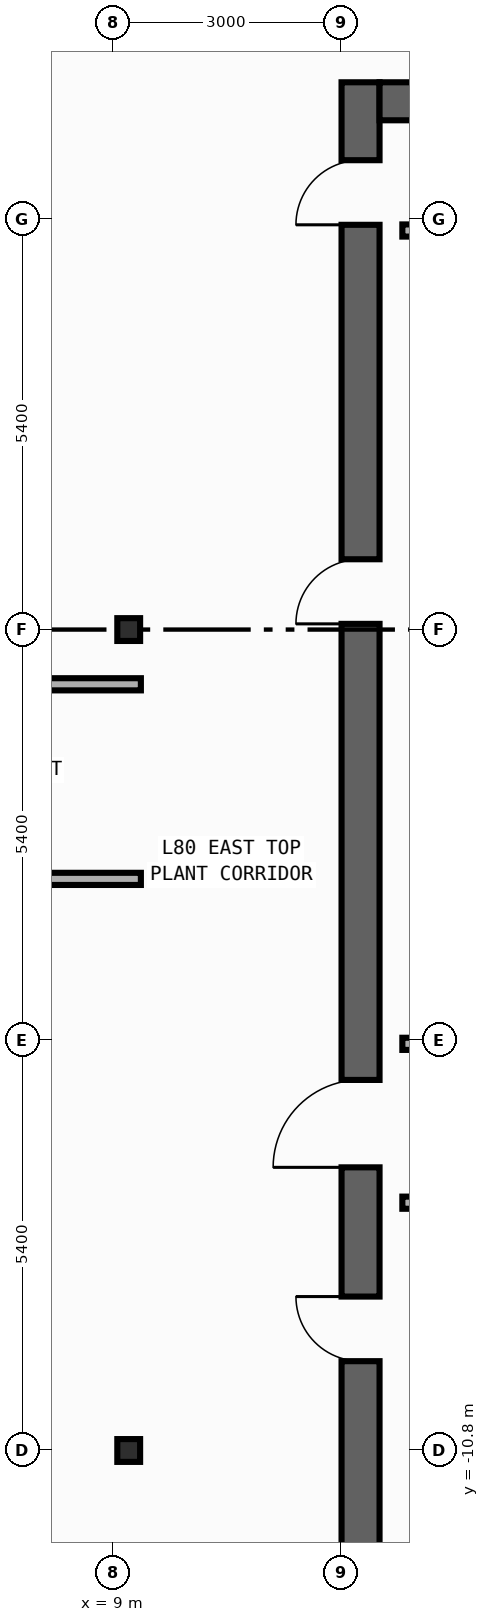
"""IFC4 building model, lengths in metres.
Left out: names, types, materials, properties, quantities, classifications, styles, units other than length and angle.
Written with IfcOpenShell. Run it as: python <this file> out.ifc"""

import sys

from ifc_helpers import new_model, si_unit, direction, frame, frame_2d, origin, origin_2d, place, context, subcontext, project, spatial, rectangle, i_section, extrude, element, fill, save


model = new_model("IFC4")
c1 = context("Model", 3, precision=1e-05, world=origin(), true_north=direction((0.0, 1.0)))
c2 = subcontext(c1, "Body", "Model", "MODEL_VIEW")
j1 = project(units=[si_unit("LENGTHUNIT", "METRE"), si_unit("PLANEANGLEUNIT", "RADIAN")], contexts=[c1])
p1 = place(None, origin())
s1 = spatial("IfcSite", under=j1, at=p1, CompositionType="ELEMENT")
p2 = place(p1, origin())
s2 = spatial("IfcBuilding", under=s1, at=p2, CompositionType="ELEMENT")
p3 = place(p2, frame((0.0, 0.0, 335.0)))
s3 = spatial("IfcBuildingStorey", under=s2, at=p3, CompositionType="ELEMENT", Elevation=335.0)
p4 = place(p3, frame((12.25, -19.8, 0.0), z_axis=(0.0, 0.0, 1.0), x_axis=(0.0, 1.0, 0.0)))
e1 = element("IfcWall", 1, at=p4, inside=s3, PredefinedType="SHEAR", context=c2, shape_type="SweptSolid", body=[
    extrude(rectangle(XDim=27.0, YDim=0.5, at=frame_2d((13.5, 0.0))), origin(), (0.0, 0.0, 1.0), 4.22),
])
p5 = place(p4, frame((19.875, 0.0, 0.0)))
e2 = element("IfcOpeningElement", 2, at=p5, cuts=e1, PredefinedType="OPENING", context=c2, shape_type="SweptSolid", body=[
    extrude(rectangle(XDim=0.85, YDim=2.1, at=frame_2d((0.425, 1.05))), frame((0.0, 0.26, 0.0), z_axis=(0.0, -1.0, 0.0), x_axis=(1.0, 0.0, 0.0)), (0.0, 0.0, 1.0), 0.52),
])
p6 = place(p4, frame((10.175, 0.0, 0.0)))
e3 = element("IfcOpeningElement", 3, at=p6, cuts=e1, PredefinedType="OPENING", context=c2, shape_type="SweptSolid", body=[
    extrude(rectangle(XDim=0.85, YDim=2.1, at=frame_2d((0.425, 1.05))), frame((0.0, 0.26, 0.0), z_axis=(0.0, -1.0, 0.0), x_axis=(1.0, 0.0, 0.0)), (0.0, 0.0, 1.0), 0.52),
])
p7 = place(p4, frame((12.725, 0.0, 0.0)))
e4 = element("IfcOpeningElement", 4, at=p7, cuts=e1, PredefinedType="OPENING", context=c2, shape_type="SweptSolid", body=[
    extrude(rectangle(XDim=1.15, YDim=2.2, at=frame_2d((0.575, 1.1))), frame((0.0, 0.26, 0.0), z_axis=(0.0, -1.0, 0.0), x_axis=(1.0, 0.0, 0.0)), (0.0, 0.0, 1.0), 0.52),
])
p8 = place(p4, frame((25.125, 0.0, 0.0)))
e5 = element("IfcOpeningElement", 5, at=p8, cuts=e1, PredefinedType="OPENING", context=c2, shape_type="SweptSolid", body=[
    extrude(rectangle(XDim=0.85, YDim=2.1, at=frame_2d((0.425, 1.05))), frame((0.0, 0.26, 0.0), z_axis=(0.0, -1.0, 0.0), x_axis=(1.0, 0.0, 0.0)), (0.0, 0.0, 1.0), 0.52),
])
p9 = place(p3, frame((12.5, 6.95, 0.0), z_axis=(0.0, 0.0, 1.0), x_axis=(1.0, 0.0, 0.0)))
e6 = element("IfcWall", 6, at=p9, inside=s3, PredefinedType="SHEAR", context=c2, shape_type="SweptSolid", body=[
    extrude(rectangle(XDim=7.4, YDim=0.5, at=frame_2d((3.7, 0.0))), origin(), (0.0, 0.0, 1.0), 4.22),
])
for number, where, z_axis, x_axis in (
    (7, (9.2, -10.8, 0.0), (0.0, 0.0, 1.0), (1.0, 0.0, 0.0)),
    (8, (9.2, 0.0, 0.0), (0.0, 0.0, 1.0), (1.0, 0.0, 0.0)),
):
    element("IfcColumn", number, at=place(p3, frame(where, z_axis=z_axis, x_axis=x_axis)), inside=s3, PredefinedType="COLUMN", context=c2, shape_type="SweptSolid", body=[
        extrude(i_section(OverallWidth=0.3, OverallDepth=0.3, WebThickness=0.01, FlangeThickness=0.015, FilletRadius=0.018, at=origin_2d()), origin(), (0.0, 0.0, 1.0), 4.5),
    ])
for number, where, z_axis, x_axis in (
    (9, (12.8, -5.45, 0.0), (0.0, 0.0, 1.0), (1.0, 0.0, 0.0)),
    (10, (12.8, -7.54, 0.0), (0.0, 0.0, 1.0), (1.0, 0.0, 0.0)),
    (11, (12.8, 5.25, 0.0), (0.0, 0.0, 1.0), (1.0, 0.0, 0.0)),
):
    element("IfcWall", number, at=place(p3, frame(where, z_axis=z_axis, x_axis=x_axis)), inside=s3, PredefinedType="STANDARD", context=c2, shape_type="SweptSolid", body=[
        extrude(rectangle(XDim=2.6, YDim=0.16, at=frame_2d((1.3, 0.0))), origin(), (0.0, 0.0, 1.0), 4.22),
    ])
p10 = place(p3, frame((1.88, -3.28, 0.0), z_axis=(0.0, 0.0, 1.0), x_axis=(1.0, 0.0, 0.0)))
e12 = element("IfcWall", 12, at=p10, inside=s3, PredefinedType="PARTITIONING", context=c2, shape_type="SweptSolid", body=[
    extrude(rectangle(XDim=7.48, YDim=0.16, at=frame_2d((3.74, 0.0))), origin(), (0.0, 0.0, 1.0), 4.22),
])
p11 = place(p10, frame((0.46, 0.0, 0.0)))
e13 = element("IfcOpeningElement", 13, at=p11, cuts=e12, PredefinedType="OPENING", context=c2, shape_type="SweptSolid", body=[
    extrude(rectangle(XDim=0.9, YDim=2.15, at=frame_2d((0.45, 1.075))), frame((0.0, 0.09, 0.0), z_axis=(0.0, -1.0, 0.0), x_axis=(1.0, 0.0, 0.0)), (0.0, 0.0, 1.0), 0.18),
])
p12 = place(p3, frame((2.58, -0.72, 0.0), z_axis=(0.0, 0.0, 1.0), x_axis=(1.0, 0.0, 0.0)))
e14 = element("IfcWall", 14, at=p12, inside=s3, PredefinedType="PARTITIONING", context=c2, shape_type="SweptSolid", body=[
    extrude(rectangle(XDim=6.78, YDim=0.16, at=frame_2d((3.39, 0.0))), origin(), (0.0, 0.0, 1.0), 4.22),
])
p13 = place(p12, frame((0.46, 0.0, 0.0)))
e15 = element("IfcOpeningElement", 15, at=p13, cuts=e14, PredefinedType="OPENING", context=c2, shape_type="SweptSolid", body=[
    extrude(rectangle(XDim=0.9, YDim=2.15, at=frame_2d((0.45, 1.075))), frame((0.0, 0.09, 0.0), z_axis=(0.0, -1.0, 0.0), x_axis=(1.0, 0.0, 0.0)), (0.0, 0.0, 1.0), 0.18),
])
p14 = place(p5, origin())
e16 = element("IfcDoor", 16, at=p14, inside=s3, OperationType="SINGLE_SWING_LEFT", PredefinedType="DOOR", context=c2, shape_type="SweptSolid", body=[
    extrude(rectangle(XDim=0.85, YDim=2.1, at=frame_2d((0.425, 1.05))), frame((0.0, 0.025, 0.0), z_axis=(0.0, -1.0, 0.0), x_axis=(1.0, 0.0, 0.0)), (0.0, 0.0, 1.0), 0.05),
])
fill(e2, e16)
p15 = place(p6, origin())
e17 = element("IfcDoor", 17, at=p15, inside=s3, OperationType="SINGLE_SWING_RIGHT", PredefinedType="DOOR", context=c2, shape_type="SweptSolid", body=[
    extrude(rectangle(XDim=0.85, YDim=2.1, at=frame_2d((0.425, 1.05))), frame((0.0, 0.025, 0.0), z_axis=(0.0, -1.0, 0.0), x_axis=(1.0, 0.0, 0.0)), (0.0, 0.0, 1.0), 0.05),
])
fill(e3, e17)
p16 = place(p7, origin())
e18 = element("IfcDoor", 18, at=p16, inside=s3, OperationType="SINGLE_SWING_LEFT", PredefinedType="DOOR", context=c2, shape_type="SweptSolid", body=[
    extrude(rectangle(XDim=1.15, YDim=2.2, at=frame_2d((0.575, 1.1))), frame((0.0, 0.025, 0.0), z_axis=(0.0, -1.0, 0.0), x_axis=(1.0, 0.0, 0.0)), (0.0, 0.0, 1.0), 0.05),
])
fill(e4, e18)
p17 = place(p8, origin())
e19 = element("IfcDoor", 19, at=p17, inside=s3, OperationType="SINGLE_SWING_LEFT", PredefinedType="DOOR", context=c2, shape_type="SweptSolid", body=[
    extrude(rectangle(XDim=0.85, YDim=2.1, at=frame_2d((0.425, 1.05))), frame((0.0, 0.025, 0.0), z_axis=(0.0, -1.0, 0.0), x_axis=(1.0, 0.0, 0.0)), (0.0, 0.0, 1.0), 0.05),
])
fill(e5, e19)
save(model, sys.argv[1])
